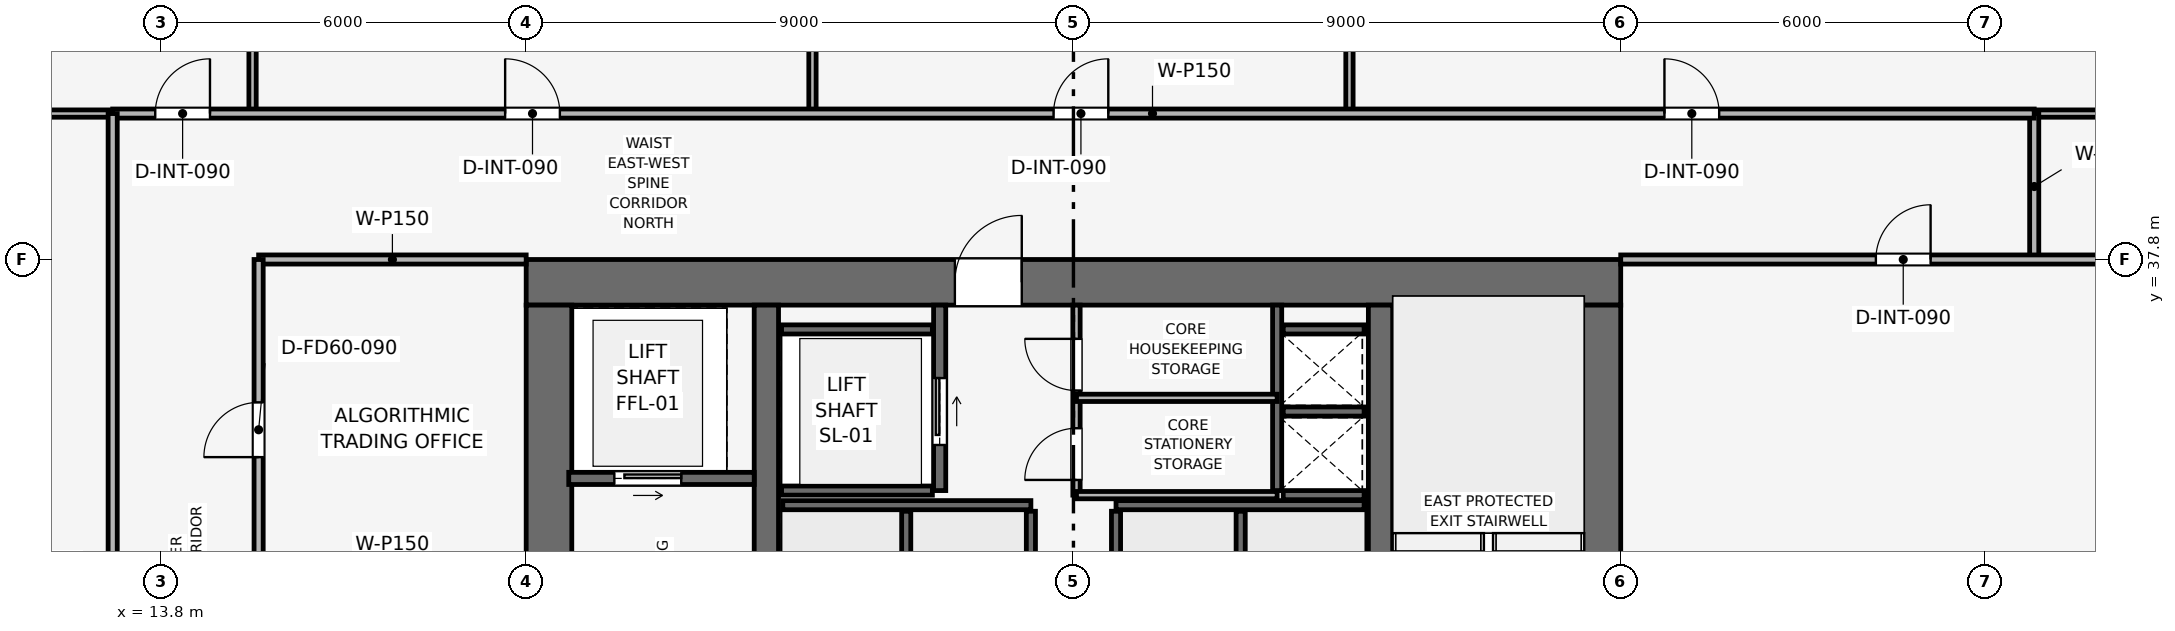
"""IFC4 building model, lengths in metres.
Left out: names, types, materials, properties, quantities, classifications, styles, units other than length and angle.
Written with IfcOpenShell. Run it as: python <this file> out.ifc"""

import sys

from ifc_helpers import new_model, si_unit, direction, frame, frame_2d, origin, place, context, subcontext, project, spatial, rectangle, extrude, element, fill, save


model = new_model("IFC4")
c1 = context("Model", 3, precision=1e-05, world=origin(), true_north=direction((0.0, 1.0)))
c2 = subcontext(c1, "Body", "Model", "MODEL_VIEW")
j1 = project(units=[si_unit("LENGTHUNIT", "METRE"), si_unit("PLANEANGLEUNIT", "RADIAN")], contexts=[c1])
p1 = place(None, origin())
s1 = spatial("IfcSite", under=j1, at=p1, CompositionType="ELEMENT")
p2 = place(p1, origin())
s2 = spatial("IfcBuilding", under=s1, at=p2, CompositionType="ELEMENT")
p3 = place(p2, frame((0.0, 0.0, 233.7)))
s3 = spatial("IfcBuildingStorey", under=s2, at=p3, CompositionType="ELEMENT", Elevation=233.7)
p4 = place(p3, frame((19.8, 37.425, 0.0), z_axis=(0.0, 0.0, 1.0), x_axis=(1.0, 0.0, 0.0)))
e1 = element("IfcWall", 1, at=p4, inside=s3, PredefinedType="SHEAR", context=c2, shape_type="SweptSolid", body=[
    extrude(rectangle(XDim=18.0, YDim=0.75, at=frame_2d((9.0, 0.0))), origin(), (0.0, 0.0, 1.0), 3.75),
])
p5 = place(p4, frame((7.05, 0.0, 0.0)))
e2 = element("IfcOpeningElement", 2, at=p5, cuts=e1, PredefinedType="OPENING", context=c2, shape_type="SweptSolid", body=[
    extrude(rectangle(XDim=1.1, YDim=2.15, at=frame_2d((0.55, 1.075))), frame((0.0, 0.385, 0.0), z_axis=(0.0, -1.0, 0.0), x_axis=(1.0, 0.0, 0.0)), (0.0, 0.0, 1.0), 0.77),
])
p6 = place(p3, frame((20.175, 20.55, 0.0), z_axis=(0.0, 0.0, 1.0), x_axis=(0.0, 1.0, 0.0)))
e3 = element("IfcWall", 3, at=p6, inside=s3, PredefinedType="SHEAR", context=c2, shape_type="SweptSolid", body=[
    extrude(rectangle(XDim=16.5, YDim=0.75, at=frame_2d((8.25, 0.0))), origin(), (0.0, 0.0, 1.0), 3.75),
])
p7 = place(p6, frame((10.25, 0.0, 0.0)))
e4 = element("IfcOpeningElement", 4, at=p7, cuts=e3, PredefinedType="OPENING", context=c2, shape_type="SweptSolid", body=[
    extrude(rectangle(XDim=1.1, YDim=2.15, at=frame_2d((0.55, 1.075))), frame((0.0, 0.385, 0.0), z_axis=(0.0, -1.0, 0.0), x_axis=(1.0, 0.0, 0.0)), (0.0, 0.0, 1.0), 0.77),
])
p8 = place(p3, frame((37.425, 20.55, 0.0), z_axis=(0.0, 0.0, 1.0), x_axis=(0.0, 1.0, 0.0)))
e5 = element("IfcWall", 5, at=p8, inside=s3, PredefinedType="SHEAR", context=c2, shape_type="SweptSolid", body=[
    extrude(rectangle(XDim=16.5, YDim=0.75, at=frame_2d((8.25, 0.0))), origin(), (0.0, 0.0, 1.0), 3.75),
])
p9 = place(p8, frame((4.75, 0.0, 0.0)))
e6 = element("IfcOpeningElement", 6, at=p9, cuts=e5, PredefinedType="OPENING", context=c2, shape_type="SweptSolid", body=[
    extrude(rectangle(XDim=1.1, YDim=2.15, at=frame_2d((0.55, 1.075))), frame((0.0, 0.385, 0.0), z_axis=(0.0, -1.0, 0.0), x_axis=(1.0, 0.0, 0.0)), (0.0, 0.0, 1.0), 0.77),
])
for number, where, z_axis, x_axis in (
    (7, (23.75, 20.55, 0.0), (0.0, 0.0, 1.0), (0.0, 1.0, 0.0)),
    (8, (33.85, 20.55, 0.0), (0.0, 0.0, 1.0), (0.0, 1.0, 0.0)),
):
    element("IfcWall", number, at=place(p3, frame(where, z_axis=z_axis, x_axis=x_axis)), inside=s3, PredefinedType="SHEAR", context=c2, shape_type="SweptSolid", body=[
        extrude(rectangle(XDim=16.5, YDim=0.4, at=frame_2d((8.25, 0.0))), origin(), (0.0, 0.0, 1.0), 3.75),
    ])
p10 = place(p3, frame((32.15, 34.0, 0.0), z_axis=(0.0, 0.0, 1.0), x_axis=(0.0, 1.0, 0.0)))
e9 = element("IfcWall", 9, at=p10, inside=s3, PredefinedType="SHEAR", context=c2, shape_type="SweptSolid", body=[
    extrude(rectangle(XDim=3.05, YDim=0.15, at=frame_2d((1.525, 0.0))), origin(), (0.0, 0.0, 1.0), 3.5),
])
for number, where, z_axis, x_axis in (
    (10, (32.25, 33.925, 0.0), (0.0, 0.0, 1.0), (1.0, 0.0, 0.0)),
    (11, (32.25, 35.3, 0.0), (0.0, 0.0, 1.0), (1.0, 0.0, 0.0)),
):
    element("IfcWall", number, at=place(p3, frame(where, z_axis=z_axis, x_axis=x_axis)), inside=s3, PredefinedType="SHEAR", context=c2, shape_type="SweptSolid", body=[
        extrude(rectangle(XDim=1.33, YDim=0.15, at=frame_2d((0.665, 0.0))), origin(), (0.0, 0.0, 1.0), 3.5),
    ])
p11 = place(p3, frame((20.5, 34.2, 0.0), z_axis=(0.0, 0.0, 1.0), x_axis=(1.0, 0.0, 0.0)))
e12 = element("IfcWall", 12, at=p11, inside=s3, PredefinedType="SHEAR", context=c2, shape_type="SweptSolid", body=[
    extrude(rectangle(XDim=3.05, YDim=0.2, at=frame_2d((1.525, 0.0))), origin(), (0.0, 0.0, 1.0), 3.5),
])
p12 = place(p11, frame((0.75, 0.0, 0.0)))
e13 = element("IfcOpeningElement", 13, at=p12, cuts=e12, PredefinedType="OPENING", context=c2, shape_type="SweptSolid", body=[
    extrude(rectangle(XDim=1.1, YDim=2.15, at=frame_2d((0.55, 1.075))), frame((0.0, 0.11, 0.0), z_axis=(0.0, -1.0, 0.0), x_axis=(1.0, 0.0, 0.0)), (0.0, 0.0, 1.0), 0.22),
])
p13 = place(p3, frame((26.6, 34.0, 0.0), z_axis=(0.0, 0.0, 1.0), x_axis=(0.0, 1.0, 0.0)))
e14 = element("IfcWall", 14, at=p13, inside=s3, PredefinedType="SHEAR", context=c2, shape_type="SweptSolid", body=[
    extrude(rectangle(XDim=3.05, YDim=0.2, at=frame_2d((1.525, 0.0))), origin(), (0.0, 0.0, 1.0), 3.5),
])
p14 = place(p13, frame((0.75, 0.0, 0.0)))
e15 = element("IfcOpeningElement", 15, at=p14, cuts=e14, PredefinedType="OPENING", context=c2, shape_type="SweptSolid", body=[
    extrude(rectangle(XDim=1.1, YDim=2.15, at=frame_2d((0.55, 1.075))), frame((0.0, 0.11, 0.0), z_axis=(0.0, -1.0, 0.0), x_axis=(1.0, 0.0, 0.0)), (0.0, 0.0, 1.0), 0.22),
])
for number, where, z_axis, x_axis in (
    (16, (24.0, 34.0, 0.0), (0.0, 0.0, 1.0), (1.0, 0.0, 0.0)),
    (17, (24.0, 36.65, 0.0), (0.0, 0.0, 1.0), (1.0, 0.0, 0.0)),
):
    element("IfcWall", number, at=place(p3, frame(where, z_axis=z_axis, x_axis=x_axis)), inside=s3, PredefinedType="SHEAR", context=c2, shape_type="SweptSolid", body=[
        extrude(rectangle(XDim=2.48, YDim=0.15, at=frame_2d((1.24, 0.0))), origin(), (0.0, 0.0, 1.0), 3.5),
    ])
p15 = place(p3, frame((32.25, 36.65, 0.0), z_axis=(0.0, 0.0, 1.0), x_axis=(1.0, 0.0, 0.0)))
e18 = element("IfcWall", 18, at=p15, inside=s3, PredefinedType="SHEAR", context=c2, shape_type="SweptSolid", body=[
    extrude(rectangle(XDim=1.33, YDim=0.15, at=frame_2d((0.665, 0.0))), origin(), (0.0, 0.0, 1.0), 3.5),
])
for number, where, z_axis, x_axis in (
    (19, (24.02, 33.76, 0.0), (0.0, 0.0, 1.0), (1.0, 0.0, 0.0)),
    (20, (29.5, 33.76, 0.0), (0.0, 0.0, 1.0), (1.0, 0.0, 0.0)),
):
    element("IfcWall", number, at=place(p3, frame(where, z_axis=z_axis, x_axis=x_axis)), inside=s3, PredefinedType="SHEAR", context=c2, shape_type="SweptSolid", body=[
        extrude(rectangle(XDim=4.08, YDim=0.15, at=frame_2d((2.04, 0.0))), origin(), (0.0, 0.0, 1.0), 3.5),
    ])
for number, where, z_axis, x_axis in (
    (21, (26.05, 31.42, 0.0), (0.0, 0.0, 1.0), (0.0, 1.0, 0.0)),
    (22, (28.1, 31.42, 0.0), (0.0, 0.0, 1.0), (0.0, 1.0, 0.0)),
    (23, (29.5, 31.42, 0.0), (0.0, 0.0, 1.0), (0.0, 1.0, 0.0)),
    (24, (31.55, 31.42, 0.0), (0.0, 0.0, 1.0), (0.0, 1.0, 0.0)),
):
    element("IfcWall", number, at=place(p3, frame(where, z_axis=z_axis, x_axis=x_axis)), inside=s3, PredefinedType="SHEAR", context=c2, shape_type="SweptSolid", body=[
        extrude(rectangle(XDim=2.24, YDim=0.15, at=frame_2d((1.12, 0.0))), origin(), (0.0, 0.0, 1.0), 3.5),
    ])
p16 = place(p3, frame((28.85, 33.925, 0.0), z_axis=(0.0, 0.0, 1.0), x_axis=(0.0, 1.0, 0.0)))
e25 = element("IfcWall", 25, at=p16, inside=s3, PredefinedType="PARTITIONING", context=c2, shape_type="SweptSolid", body=[
    extrude(rectangle(XDim=3.125, YDim=0.12, at=frame_2d((1.562, 0.0))), origin(), (0.0, 0.0, 1.0), 3.5),
])
p17 = place(p16, frame((0.25, 0.0, 0.0)))
e26 = element("IfcOpeningElement", 26, at=p17, cuts=e25, PredefinedType="OPENING", context=c2, shape_type="SweptSolid", body=[
    extrude(rectangle(XDim=0.85, YDim=2.1, at=frame_2d((0.425, 1.05))), frame((0.0, 0.07, 0.0), z_axis=(0.0, -1.0, 0.0), x_axis=(1.0, 0.0, 0.0)), (0.0, 0.0, 1.0), 0.14),
])
p18 = place(p16, frame((1.72, 0.0, 0.0)))
e27 = element("IfcOpeningElement", 27, at=p18, cuts=e25, PredefinedType="OPENING", context=c2, shape_type="SweptSolid", body=[
    extrude(rectangle(XDim=0.85, YDim=2.1, at=frame_2d((0.425, 1.05))), frame((0.0, 0.07, 0.0), z_axis=(0.0, -1.0, 0.0), x_axis=(1.0, 0.0, 0.0)), (0.0, 0.0, 1.0), 0.14),
])
for number, where, z_axis, x_axis in (
    (28, (28.85, 35.525, 0.0), (0.0, 0.0, 1.0), (1.0, 0.0, 0.0)),
    (29, (28.85, 33.925, 0.0), (0.0, 0.0, 1.0), (1.0, 0.0, 0.0)),
):
    element("IfcWall", number, at=place(p3, frame(where, z_axis=z_axis, x_axis=x_axis)), inside=s3, PredefinedType="PARTITIONING", context=c2, shape_type="SweptSolid", body=[
        extrude(rectangle(XDim=3.3, YDim=0.12, at=frame_2d((1.65, 0.0))), origin(), (0.0, 0.0, 1.0), 3.5),
    ])
p19 = place(p3, frame((15.4, 37.8, 0.0), z_axis=(0.0, 0.0, 1.0), x_axis=(1.0, 0.0, 0.0)))
e30 = element("IfcWall", 30, at=p19, inside=s3, PredefinedType="PARTITIONING", context=c2, shape_type="SweptSolid", body=[
    extrude(rectangle(XDim=4.4, YDim=0.15, at=frame_2d((2.2, 0.0))), origin(), (0.0, 0.0, 1.0), 3.035),
])
p20 = place(p3, frame((15.4, 32.45, 0.0), z_axis=(0.0, 0.0, 1.0), x_axis=(0.0, 1.0, 0.0)))
e31 = element("IfcWall", 31, at=p20, inside=s3, PredefinedType="PARTITIONING", context=c2, shape_type="SweptSolid", body=[
    extrude(rectangle(XDim=5.35, YDim=0.15, at=frame_2d((2.675, 0.0))), origin(), (0.0, 0.0, 1.0), 3.035),
])
p21 = place(p20, frame((2.1, 0.0, 0.0)))
e32 = element("IfcOpeningElement", 32, at=p21, cuts=e31, PredefinedType="OPENING", context=c2, shape_type="SweptSolid", body=[
    extrude(rectangle(XDim=0.9, YDim=2.1, at=frame_2d((0.45, 1.05))), frame((0.0, 0.085, 0.0), z_axis=(0.0, -1.0, 0.0), x_axis=(1.0, 0.0, 0.0)), (0.0, 0.0, 1.0), 0.17),
])
for number, where, z_axis, x_axis in (
    (33, (15.3, 40.2, 0.0), (0.0, 0.0, 1.0), (0.0, 1.0, 0.0)),
    (34, (24.508, 40.2, 0.0), (0.0, 0.0, 1.0), (0.0, 1.0, 0.0)),
    (35, (33.339, 40.2, 0.0), (0.0, 0.0, 1.0), (0.0, 1.0, 0.0)),
):
    element("IfcWall", number, at=place(p3, frame(where, z_axis=z_axis, x_axis=x_axis)), inside=s3, PredefinedType="PARTITIONING", context=c2, shape_type="SweptSolid", body=[
        extrude(rectangle(XDim=15.47, YDim=0.12, at=frame_2d((7.735, 0.0))), origin(), (0.0, 0.0, 1.0), 2.885),
    ])
p22 = place(p3, frame((1.93, 40.2, 0.0), z_axis=(0.0, 0.0, 1.0), x_axis=(1.0, 0.0, 0.0)))
e36 = element("IfcWall", 36, at=p22, inside=s3, PredefinedType="PARTITIONING", context=c2, shape_type="SweptSolid", body=[
    extrude(rectangle(XDim=11.07, YDim=0.12, at=frame_2d((5.535, 0.0))), origin(), (0.0, 0.0, 1.0), 2.885),
])
p23 = place(p3, frame((44.6, 40.2, 0.0), z_axis=(0.0, 0.0, 1.0), x_axis=(1.0, 0.0, 0.0)))
e37 = element("IfcWall", 37, at=p23, inside=s3, PredefinedType="PARTITIONING", context=c2, shape_type="SweptSolid", body=[
    extrude(rectangle(XDim=11.07, YDim=0.12, at=frame_2d((5.535, 0.0))), origin(), (0.0, 0.0, 1.0), 2.885),
])
p24 = place(p3, frame((44.6, 37.8, 0.0), z_axis=(0.0, 0.0, 1.0), x_axis=(0.0, 1.0, 0.0)))
e38 = element("IfcWall", 38, at=p24, inside=s3, PredefinedType="PARTITIONING", context=c2, shape_type="SweptSolid", body=[
    extrude(rectangle(XDim=2.4, YDim=0.15, at=frame_2d((1.2, 0.0))), origin(), (0.0, 0.0, 1.0), 3.5),
])
p25 = place(p3, frame((37.8, 37.8, 0.0), z_axis=(0.0, 0.0, 1.0), x_axis=(1.0, 0.0, 0.0)))
e39 = element("IfcWall", 39, at=p25, inside=s3, PredefinedType="PARTITIONING", context=c2, shape_type="SweptSolid", body=[
    extrude(rectangle(XDim=17.87, YDim=0.15, at=frame_2d((8.935, 0.0))), origin(), (0.0, 0.0, 1.0), 2.885),
])
p26 = place(p25, frame((4.196, 0.0, 0.0)))
e40 = element("IfcOpeningElement", 40, at=p26, cuts=e39, PredefinedType="OPENING", context=c2, shape_type="SweptSolid", body=[
    extrude(rectangle(XDim=0.9, YDim=2.1, at=frame_2d((0.45, 1.05))), frame((0.0, 0.085, 0.0), z_axis=(0.0, -1.0, 0.0), x_axis=(1.0, 0.0, 0.0)), (0.0, 0.0, 1.0), 0.17),
])
p27 = place(p3, frame((13.0, 40.2, 0.0), z_axis=(0.0, 0.0, 1.0), x_axis=(1.0, 0.0, 0.0)))
e41 = element("IfcWall", 41, at=p27, inside=s3, PredefinedType="PARTITIONING", context=c2, shape_type="SweptSolid", body=[
    extrude(rectangle(XDim=31.6, YDim=0.15, at=frame_2d((15.8, 0.0))), origin(), (0.0, 0.0, 1.0), 3.035),
])
p28 = place(p27, frame((0.7, 0.0, 0.0)))
e42 = element("IfcOpeningElement", 42, at=p28, cuts=e41, PredefinedType="OPENING", context=c2, shape_type="SweptSolid", body=[
    extrude(rectangle(XDim=0.9, YDim=2.1, at=frame_2d((0.45, 1.05))), frame((0.0, 0.085, 0.0), z_axis=(0.0, -1.0, 0.0), x_axis=(1.0, 0.0, 0.0)), (0.0, 0.0, 1.0), 0.17),
])
p29 = place(p27, frame((6.454, 0.0, 0.0)))
e43 = element("IfcOpeningElement", 43, at=p29, cuts=e41, PredefinedType="OPENING", context=c2, shape_type="SweptSolid", body=[
    extrude(rectangle(XDim=0.9, YDim=2.1, at=frame_2d((0.45, 1.05))), frame((0.0, 0.085, 0.0), z_axis=(0.0, -1.0, 0.0), x_axis=(1.0, 0.0, 0.0)), (0.0, 0.0, 1.0), 0.17),
])
p30 = place(p27, frame((15.473, 0.0, 0.0)))
e44 = element("IfcOpeningElement", 44, at=p30, cuts=e41, PredefinedType="OPENING", context=c2, shape_type="SweptSolid", body=[
    extrude(rectangle(XDim=0.9, YDim=2.1, at=frame_2d((0.45, 1.05))), frame((0.0, 0.085, 0.0), z_axis=(0.0, -1.0, 0.0), x_axis=(1.0, 0.0, 0.0)), (0.0, 0.0, 1.0), 0.17),
])
p31 = place(p27, frame((25.519, 0.0, 0.0)))
e45 = element("IfcOpeningElement", 45, at=p31, cuts=e41, PredefinedType="OPENING", context=c2, shape_type="SweptSolid", body=[
    extrude(rectangle(XDim=0.9, YDim=2.1, at=frame_2d((0.45, 1.05))), frame((0.0, 0.085, 0.0), z_axis=(0.0, -1.0, 0.0), x_axis=(1.0, 0.0, 0.0)), (0.0, 0.0, 1.0), 0.17),
])
p32 = place(p3, frame((13.0, 17.4, 0.0), z_axis=(0.0, 0.0, 1.0), x_axis=(0.0, 1.0, 0.0)))
e46 = element("IfcWall", 46, at=p32, inside=s3, PredefinedType="PARTITIONING", context=c2, shape_type="SweptSolid", body=[
    extrude(rectangle(XDim=22.8, YDim=0.15, at=frame_2d((11.4, 0.0))), origin(), (0.0, 0.0, 1.0), 3.035),
])
p33 = place(p32, frame((4.641, 0.0, 0.0)))
e47 = element("IfcOpeningElement", 47, at=p33, cuts=e46, PredefinedType="OPENING", context=c2, shape_type="SweptSolid", body=[
    extrude(rectangle(XDim=0.9, YDim=2.1, at=frame_2d((0.45, 1.05))), frame((0.0, 0.085, 0.0), z_axis=(0.0, -1.0, 0.0), x_axis=(1.0, 0.0, 0.0)), (0.0, 0.0, 1.0), 0.17),
])
p34 = place(p32, frame((13.641, 0.0, 0.0)))
e48 = element("IfcOpeningElement", 48, at=p34, cuts=e46, PredefinedType="OPENING", context=c2, shape_type="SweptSolid", body=[
    extrude(rectangle(XDim=0.9, YDim=2.1, at=frame_2d((0.45, 1.05))), frame((0.0, 0.085, 0.0), z_axis=(0.0, -1.0, 0.0), x_axis=(1.0, 0.0, 0.0)), (0.0, 0.0, 1.0), 0.17),
])
p35 = place(p12, origin())
e49 = element("IfcDoor", 49, at=p35, inside=s3, OperationType="SLIDING_TO_RIGHT", PredefinedType="DOOR", context=c2, shape_type="SweptSolid", body=[
    extrude(rectangle(XDim=1.1, YDim=2.15, at=frame_2d((0.55, 1.075))), frame((0.0, 0.025, 0.0), z_axis=(0.0, -1.0, 0.0), x_axis=(1.0, 0.0, 0.0)), (0.0, 0.0, 1.0), 0.05),
])
fill(e13, e49)
p36 = place(p14, origin())
e50 = element("IfcDoor", 50, at=p36, inside=s3, OperationType="SLIDING_TO_RIGHT", PredefinedType="DOOR", context=c2, shape_type="SweptSolid", body=[
    extrude(rectangle(XDim=1.1, YDim=2.15, at=frame_2d((0.55, 1.075))), frame((0.0, 0.025, 0.0), z_axis=(0.0, -1.0, 0.0), x_axis=(1.0, 0.0, 0.0)), (0.0, 0.0, 1.0), 0.05),
])
fill(e15, e50)
p37 = place(p17, origin())
e51 = element("IfcDoor", 51, at=p37, inside=s3, OperationType="SINGLE_SWING_LEFT", PredefinedType="DOOR", context=c2, shape_type="SweptSolid", body=[
    extrude(rectangle(XDim=0.85, YDim=2.1, at=frame_2d((0.425, 1.05))), frame((0.0, 0.025, 0.0), z_axis=(0.0, -1.0, 0.0), x_axis=(1.0, 0.0, 0.0)), (0.0, 0.0, 1.0), 0.05),
])
fill(e26, e51)
p38 = place(p18, origin())
e52 = element("IfcDoor", 52, at=p38, inside=s3, OperationType="SINGLE_SWING_RIGHT", PredefinedType="DOOR", context=c2, shape_type="SweptSolid", body=[
    extrude(rectangle(XDim=0.85, YDim=2.1, at=frame_2d((0.425, 1.05))), frame((0.0, 0.025, 0.0), z_axis=(0.0, -1.0, 0.0), x_axis=(1.0, 0.0, 0.0)), (0.0, 0.0, 1.0), 0.05),
])
fill(e27, e52)
p39 = place(p21, origin())
e53 = element("IfcDoor", 53, at=p39, inside=s3, OperationType="SINGLE_SWING_LEFT", PredefinedType="DOOR", context=c2, shape_type="SweptSolid", body=[
    extrude(rectangle(XDim=0.9, YDim=2.1, at=frame_2d((0.45, 1.05))), frame((0.0, 0.025, 0.0), z_axis=(0.0, -1.0, 0.0), x_axis=(1.0, 0.0, 0.0)), (0.0, 0.0, 1.0), 0.05),
])
fill(e32, e53)
p40 = place(p26, origin())
e54 = element("IfcDoor", 54, at=p40, inside=s3, OperationType="SINGLE_SWING_RIGHT", PredefinedType="DOOR", context=c2, shape_type="SweptSolid", body=[
    extrude(rectangle(XDim=0.9, YDim=2.1, at=frame_2d((0.45, 1.05))), frame((0.0, 0.025, 0.0), z_axis=(0.0, -1.0, 0.0), x_axis=(1.0, 0.0, 0.0)), (0.0, 0.0, 1.0), 0.05),
])
fill(e40, e54)
p41 = place(p28, origin())
e55 = element("IfcDoor", 55, at=p41, inside=s3, OperationType="SINGLE_SWING_RIGHT", PredefinedType="DOOR", context=c2, shape_type="SweptSolid", body=[
    extrude(rectangle(XDim=0.9, YDim=2.1, at=frame_2d((0.45, 1.05))), frame((0.0, 0.025, 0.0), z_axis=(0.0, -1.0, 0.0), x_axis=(1.0, 0.0, 0.0)), (0.0, 0.0, 1.0), 0.05),
])
fill(e42, e55)
p42 = place(p29, origin())
e56 = element("IfcDoor", 56, at=p42, inside=s3, OperationType="SINGLE_SWING_LEFT", PredefinedType="DOOR", context=c2, shape_type="SweptSolid", body=[
    extrude(rectangle(XDim=0.9, YDim=2.1, at=frame_2d((0.45, 1.05))), frame((0.0, 0.025, 0.0), z_axis=(0.0, -1.0, 0.0), x_axis=(1.0, 0.0, 0.0)), (0.0, 0.0, 1.0), 0.05),
])
fill(e43, e56)
p43 = place(p30, origin())
e57 = element("IfcDoor", 57, at=p43, inside=s3, OperationType="SINGLE_SWING_RIGHT", PredefinedType="DOOR", context=c2, shape_type="SweptSolid", body=[
    extrude(rectangle(XDim=0.9, YDim=2.1, at=frame_2d((0.45, 1.05))), frame((0.0, 0.025, 0.0), z_axis=(0.0, -1.0, 0.0), x_axis=(1.0, 0.0, 0.0)), (0.0, 0.0, 1.0), 0.05),
])
fill(e44, e57)
p44 = place(p31, origin())
e58 = element("IfcDoor", 58, at=p44, inside=s3, OperationType="SINGLE_SWING_LEFT", PredefinedType="DOOR", context=c2, shape_type="SweptSolid", body=[
    extrude(rectangle(XDim=0.9, YDim=2.1, at=frame_2d((0.45, 1.05))), frame((0.0, 0.025, 0.0), z_axis=(0.0, -1.0, 0.0), x_axis=(1.0, 0.0, 0.0)), (0.0, 0.0, 1.0), 0.05),
])
fill(e45, e58)
p45 = place(p5, origin())
e59 = element("IfcDoor", 59, at=p45, inside=s3, OperationType="SINGLE_SWING_RIGHT", PredefinedType="DOOR", context=c2, shape_type="SweptSolid", body=[
    extrude(rectangle(XDim=1.1, YDim=2.15, at=frame_2d((0.55, 1.075))), frame((0.0, 0.025, 0.0), z_axis=(0.0, -1.0, 0.0), x_axis=(1.0, 0.0, 0.0)), (0.0, 0.0, 1.0), 0.05),
])
fill(e2, e59)
save(model, sys.argv[1])
